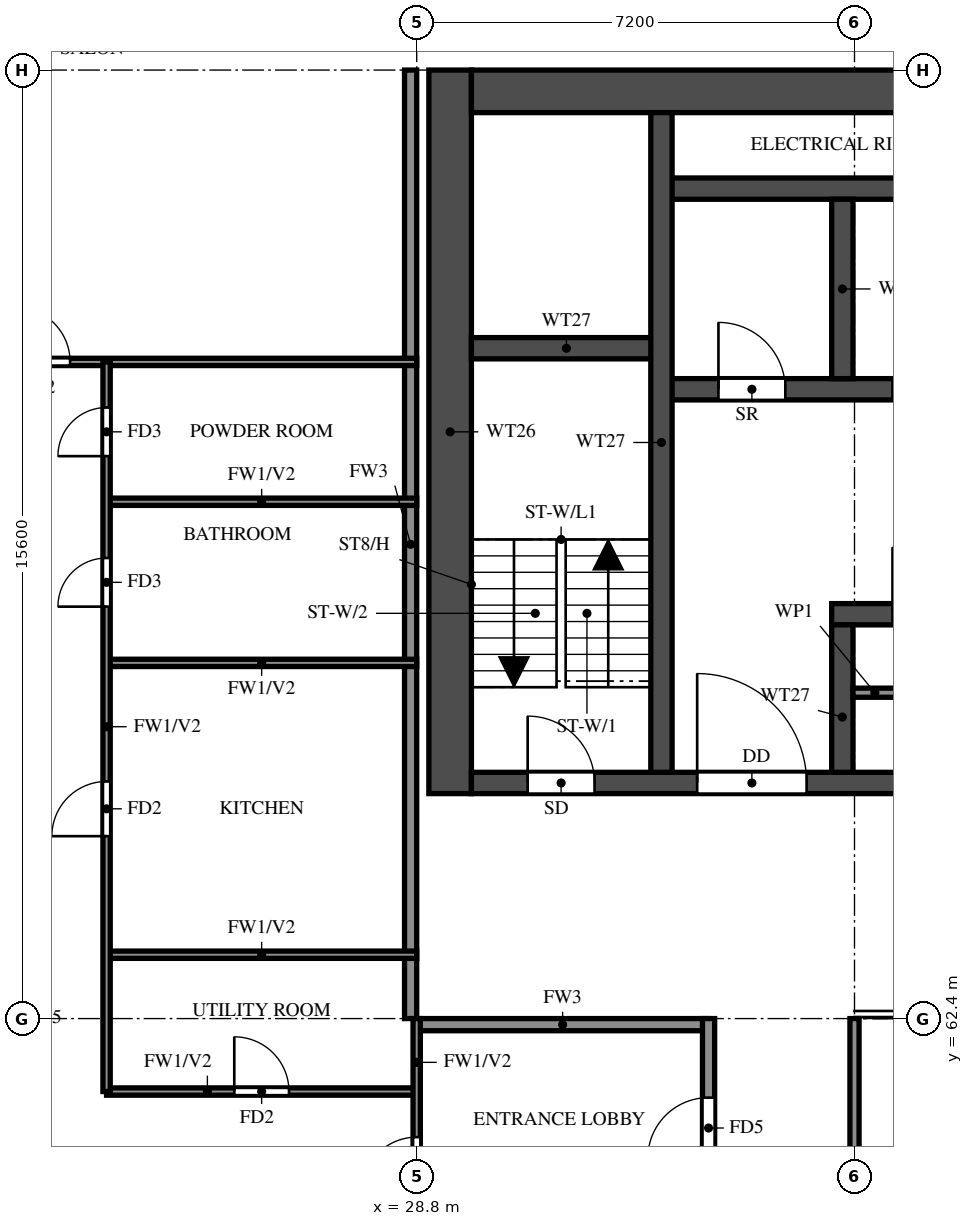
"""IFC4 building model, lengths in metres.
Left out: names, types, materials, properties, quantities, classifications, styles, units other than length and angle.
Written with IfcOpenShell. Run it as: python <this file> out.ifc"""

import sys

from ifc_helpers import new_model, si_unit, direction, frame, frame_2d, origin, place, context, subcontext, project, spatial, rectangle, extrude, element, fill, save


model = new_model("IFC4")
c1 = context("Model", 3, precision=1e-05, world=origin(), true_north=direction((0.0, 1.0)))
c2 = subcontext(c1, "Body", "Model", "MODEL_VIEW")
j1 = project(units=[si_unit("LENGTHUNIT", "METRE"), si_unit("PLANEANGLEUNIT", "RADIAN")], contexts=[c1])
p1 = place(None, origin())
s1 = spatial("IfcSite", under=j1, at=p1, CompositionType="ELEMENT")
p2 = place(p1, origin())
s2 = spatial("IfcBuilding", under=s1, at=p2, CompositionType="ELEMENT")
p3 = place(p2, frame((0.0, 0.0, 153.5)))
s3 = spatial("IfcBuildingStorey", under=s2, at=p3, CompositionType="ELEMENT", Elevation=153.5)
p4 = place(p3, frame((29.35, 66.1, 0.0), z_axis=(0.0, 0.0, 1.0), x_axis=(0.0, 1.0, 0.0)))
e1 = element("IfcWall", 1, at=p4, inside=s3, PredefinedType="SHEAR", context=c2, shape_type="SweptSolid", body=[
    extrude(rectangle(XDim=11.9, YDim=0.7, at=frame_2d((5.95, 0.0))), origin(), (0.0, 0.0, 1.0), 3.2),
])
p5 = place(p3, frame((29.7, 77.65, 0.0), z_axis=(0.0, 0.0, 1.0), x_axis=(1.0, 0.0, 0.0)))
e2 = element("IfcWall", 2, at=p5, inside=s3, PredefinedType="SHEAR", context=c2, shape_type="SweptSolid", body=[
    extrude(rectangle(XDim=41.4, YDim=0.7, at=frame_2d((20.7, 0.0))), origin(), (0.0, 0.0, 1.0), 3.2),
])
p6 = place(p3, frame((29.7, 66.275, 0.0), z_axis=(0.0, 0.0, 1.0), x_axis=(1.0, 0.0, 0.0)))
e3 = element("IfcWall", 3, at=p6, inside=s3, PredefinedType="SHEAR", context=c2, shape_type="SweptSolid", body=[
    extrude(rectangle(XDim=41.4, YDim=0.35, at=frame_2d((20.7, 0.0))), origin(), (0.0, 0.0, 1.0), 3.2),
])
p7 = place(p6, frame((0.925, 0.0, 0.0)))
e4 = element("IfcOpeningElement", 4, at=p7, cuts=e3, PredefinedType="OPENING", context=c2, shape_type="SweptSolid", body=[
    extrude(rectangle(XDim=1.1, YDim=2.1, at=frame_2d((0.55, 1.05))), frame((0.0, 0.185, 0.0), z_axis=(0.0, -1.0, 0.0), x_axis=(1.0, 0.0, 0.0)), (0.0, 0.0, 1.0), 0.37),
])
p8 = place(p6, frame((3.712, 0.0, 0.0)))
e5 = element("IfcOpeningElement", 5, at=p8, cuts=e3, PredefinedType="OPENING", context=c2, shape_type="SweptSolid", body=[
    extrude(rectangle(XDim=1.8, YDim=2.1, at=frame_2d((0.9, 1.05))), frame((0.0, 0.185, 0.0), z_axis=(0.0, -1.0, 0.0), x_axis=(1.0, 0.0, 0.0)), (0.0, 0.0, 1.0), 0.37),
])
p9 = place(p3, frame((35.625, 69.05, 0.0), z_axis=(0.0, 0.0, 1.0), x_axis=(1.0, 0.0, 0.0)))
e6 = element("IfcWall", 6, at=p9, inside=s3, PredefinedType="SHEAR", context=c2, shape_type="SweptSolid", body=[
    extrude(rectangle(XDim=24.1, YDim=0.35, at=frame_2d((12.05, 0.0))), origin(), (0.0, 0.0, 1.0), 3.2),
])
p10 = place(p9, frame((1.0, 0.0, 0.0)))
e7 = element("IfcOpeningElement", 7, at=p10, cuts=e6, PredefinedType="OPENING", context=c2, shape_type="SweptSolid", body=[
    extrude(rectangle(XDim=1.1, YDim=2.1, at=frame_2d((0.55, 1.05))), frame((0.0, 0.185, 0.0), z_axis=(0.0, -1.0, 0.0), x_axis=(1.0, 0.0, 0.0)), (0.0, 0.0, 1.0), 0.37),
])
p11 = place(p9, frame((3.75, 0.0, 0.0)))
e8 = element("IfcOpeningElement", 8, at=p11, cuts=e6, PredefinedType="OPENING", context=c2, shape_type="SweptSolid", body=[
    extrude(rectangle(XDim=1.1, YDim=2.1, at=frame_2d((0.55, 1.05))), frame((0.0, 0.185, 0.0), z_axis=(0.0, -1.0, 0.0), x_axis=(1.0, 0.0, 0.0)), (0.0, 0.0, 1.0), 0.37),
])
p12 = place(p9, frame((6.5, 0.0, 0.0)))
e9 = element("IfcOpeningElement", 9, at=p12, cuts=e6, PredefinedType="OPENING", context=c2, shape_type="SweptSolid", body=[
    extrude(rectangle(XDim=1.1, YDim=2.1, at=frame_2d((0.55, 1.05))), frame((0.0, 0.185, 0.0), z_axis=(0.0, -1.0, 0.0), x_axis=(1.0, 0.0, 0.0)), (0.0, 0.0, 1.0), 0.37),
])
p13 = place(p9, frame((9.25, 0.0, 0.0)))
e10 = element("IfcOpeningElement", 10, at=p13, cuts=e6, PredefinedType="OPENING", context=c2, shape_type="SweptSolid", body=[
    extrude(rectangle(XDim=1.1, YDim=2.1, at=frame_2d((0.55, 1.05))), frame((0.0, 0.185, 0.0), z_axis=(0.0, -1.0, 0.0), x_axis=(1.0, 0.0, 0.0)), (0.0, 0.0, 1.0), 0.37),
])
p14 = place(p9, frame((12.0, 0.0, 0.0)))
e11 = element("IfcOpeningElement", 11, at=p14, cuts=e6, PredefinedType="OPENING", context=c2, shape_type="SweptSolid", body=[
    extrude(rectangle(XDim=1.1, YDim=2.1, at=frame_2d((0.55, 1.05))), frame((0.0, 0.185, 0.0), z_axis=(0.0, -1.0, 0.0), x_axis=(1.0, 0.0, 0.0)), (0.0, 0.0, 1.0), 0.37),
])
p15 = place(p9, frame((14.75, 0.0, 0.0)))
e12 = element("IfcOpeningElement", 12, at=p15, cuts=e6, PredefinedType="OPENING", context=c2, shape_type="SweptSolid", body=[
    extrude(rectangle(XDim=1.1, YDim=2.1, at=frame_2d((0.55, 1.05))), frame((0.0, 0.185, 0.0), z_axis=(0.0, -1.0, 0.0), x_axis=(1.0, 0.0, 0.0)), (0.0, 0.0, 1.0), 0.37),
])
p16 = place(p9, frame((17.625, 0.0, 0.0)))
e13 = element("IfcOpeningElement", 13, at=p16, cuts=e6, PredefinedType="OPENING", context=c2, shape_type="SweptSolid", body=[
    extrude(rectangle(XDim=1.1, YDim=2.1, at=frame_2d((0.55, 1.05))), frame((0.0, 0.185, 0.0), z_axis=(0.0, -1.0, 0.0), x_axis=(1.0, 0.0, 0.0)), (0.0, 0.0, 1.0), 0.37),
])
p17 = place(p9, frame((20.625, 0.0, 0.0)))
e14 = element("IfcOpeningElement", 14, at=p17, cuts=e6, PredefinedType="OPENING", context=c2, shape_type="SweptSolid", body=[
    extrude(rectangle(XDim=1.1, YDim=2.1, at=frame_2d((0.55, 1.05))), frame((0.0, 0.185, 0.0), z_axis=(0.0, -1.0, 0.0), x_axis=(1.0, 0.0, 0.0)), (0.0, 0.0, 1.0), 0.37),
])
p18 = place(p3, frame((32.825, 72.75, 0.0), z_axis=(0.0, 0.0, 1.0), x_axis=(1.0, 0.0, 0.0)))
e15 = element("IfcWall", 15, at=p18, inside=s3, PredefinedType="SHEAR", context=c2, shape_type="SweptSolid", body=[
    extrude(rectangle(XDim=35.15, YDim=0.35, at=frame_2d((17.575, 0.0))), origin(), (0.0, 0.0, 1.0), 3.2),
])
p19 = place(p18, frame((19.8, 0.0, 0.0)))
e16 = element("IfcOpeningElement", 16, at=p19, cuts=e15, PredefinedType="OPENING", context=c2, shape_type="SweptSolid", body=[
    extrude(rectangle(XDim=1.1, YDim=2.1, at=frame_2d((0.55, 1.05))), frame((0.0, 0.185, 0.0), z_axis=(0.0, -1.0, 0.0), x_axis=(1.0, 0.0, 0.0)), (0.0, 0.0, 1.0), 0.37),
])
p20 = place(p18, frame((27.7, 0.0, 0.0)))
e17 = element("IfcOpeningElement", 17, at=p20, cuts=e15, PredefinedType="OPENING", context=c2, shape_type="SweptSolid", body=[
    extrude(rectangle(XDim=1.1, YDim=2.1, at=frame_2d((0.55, 1.05))), frame((0.0, 0.185, 0.0), z_axis=(0.0, -1.0, 0.0), x_axis=(1.0, 0.0, 0.0)), (0.0, 0.0, 1.0), 0.37),
])
p21 = place(p18, frame((30.3, 0.0, 0.0)))
e18 = element("IfcOpeningElement", 18, at=p21, cuts=e15, PredefinedType="OPENING", context=c2, shape_type="SweptSolid", body=[
    extrude(rectangle(XDim=1.1, YDim=2.1, at=frame_2d((0.55, 1.05))), frame((0.0, 0.185, 0.0), z_axis=(0.0, -1.0, 0.0), x_axis=(1.0, 0.0, 0.0)), (0.0, 0.0, 1.0), 0.37),
])
p22 = place(p18, frame((3.8, 0.0, 0.0)))
e19 = element("IfcOpeningElement", 19, at=p22, cuts=e15, PredefinedType="OPENING", context=c2, shape_type="SweptSolid", body=[
    extrude(rectangle(XDim=1.1, YDim=2.1, at=frame_2d((0.55, 1.05))), frame((0.0, 0.185, 0.0), z_axis=(0.0, -1.0, 0.0), x_axis=(1.0, 0.0, 0.0)), (0.0, 0.0, 1.0), 0.37),
])
p23 = place(p18, frame((6.55, 0.0, 0.0)))
e20 = element("IfcOpeningElement", 20, at=p23, cuts=e15, PredefinedType="OPENING", context=c2, shape_type="SweptSolid", body=[
    extrude(rectangle(XDim=1.1, YDim=2.1, at=frame_2d((0.55, 1.05))), frame((0.0, 0.185, 0.0), z_axis=(0.0, -1.0, 0.0), x_axis=(1.0, 0.0, 0.0)), (0.0, 0.0, 1.0), 0.37),
])
p24 = place(p18, frame((9.3, 0.0, 0.0)))
e21 = element("IfcOpeningElement", 21, at=p24, cuts=e15, PredefinedType="OPENING", context=c2, shape_type="SweptSolid", body=[
    extrude(rectangle(XDim=1.1, YDim=2.1, at=frame_2d((0.55, 1.05))), frame((0.0, 0.185, 0.0), z_axis=(0.0, -1.0, 0.0), x_axis=(1.0, 0.0, 0.0)), (0.0, 0.0, 1.0), 0.37),
])
p25 = place(p18, frame((12.05, 0.0, 0.0)))
e22 = element("IfcOpeningElement", 22, at=p25, cuts=e15, PredefinedType="OPENING", context=c2, shape_type="SweptSolid", body=[
    extrude(rectangle(XDim=1.1, YDim=2.1, at=frame_2d((0.55, 1.05))), frame((0.0, 0.185, 0.0), z_axis=(0.0, -1.0, 0.0), x_axis=(1.0, 0.0, 0.0)), (0.0, 0.0, 1.0), 0.37),
])
p26 = place(p18, frame((14.8, 0.0, 0.0)))
e23 = element("IfcOpeningElement", 23, at=p26, cuts=e15, PredefinedType="OPENING", context=c2, shape_type="SweptSolid", body=[
    extrude(rectangle(XDim=1.1, YDim=2.1, at=frame_2d((0.55, 1.05))), frame((0.0, 0.185, 0.0), z_axis=(0.0, -1.0, 0.0), x_axis=(1.0, 0.0, 0.0)), (0.0, 0.0, 1.0), 0.37),
])
p27 = place(p18, frame((17.55, 0.0, 0.0)))
e24 = element("IfcOpeningElement", 24, at=p27, cuts=e15, PredefinedType="OPENING", context=c2, shape_type="SweptSolid", body=[
    extrude(rectangle(XDim=1.1, YDim=2.1, at=frame_2d((0.55, 1.05))), frame((0.0, 0.185, 0.0), z_axis=(0.0, -1.0, 0.0), x_axis=(1.0, 0.0, 0.0)), (0.0, 0.0, 1.0), 0.37),
])
p28 = place(p18, frame((0.938, 0.0, 0.0)))
e25 = element("IfcOpeningElement", 25, at=p28, cuts=e15, PredefinedType="OPENING", context=c2, shape_type="SweptSolid", body=[
    extrude(rectangle(XDim=1.1, YDim=2.1, at=frame_2d((0.55, 1.05))), frame((0.0, 0.185, 0.0), z_axis=(0.0, -1.0, 0.0), x_axis=(1.0, 0.0, 0.0)), (0.0, 0.0, 1.0), 0.37),
])
p29 = place(p3, frame((32.825, 76.05, 0.0), z_axis=(0.0, 0.0, 1.0), x_axis=(1.0, 0.0, 0.0)))
e26 = element("IfcWall", 26, at=p29, inside=s3, PredefinedType="SHEAR", context=c2, shape_type="SweptSolid", body=[
    extrude(rectangle(XDim=35.15, YDim=0.35, at=frame_2d((17.575, 0.0))), origin(), (0.0, 0.0, 1.0), 3.2),
])
p30 = place(p3, frame((29.7, 73.425, 0.0), z_axis=(0.0, 0.0, 1.0), x_axis=(1.0, 0.0, 0.0)))
e27 = element("IfcWall", 27, at=p30, inside=s3, PredefinedType="SHEAR", context=c2, shape_type="SweptSolid", body=[
    extrude(rectangle(XDim=3.125, YDim=0.35, at=frame_2d((1.562, 0.0))), origin(), (0.0, 0.0, 1.0), 3.2),
])
p31 = place(p3, frame((32.825, 66.45, 0.0), z_axis=(0.0, 0.0, 1.0), x_axis=(0.0, 1.0, 0.0)))
e28 = element("IfcWall", 28, at=p31, inside=s3, PredefinedType="SHEAR", context=c2, shape_type="SweptSolid", body=[
    extrude(rectangle(XDim=10.85, YDim=0.35, at=frame_2d((5.425, 0.0))), origin(), (0.0, 0.0, 1.0), 3.2),
])
p32 = place(p3, frame((35.8, 66.45, 0.0), z_axis=(0.0, 0.0, 1.0), x_axis=(0.0, 1.0, 0.0)))
e29 = element("IfcWall", 29, at=p32, inside=s3, PredefinedType="SHEAR", context=c2, shape_type="SweptSolid", body=[
    extrude(rectangle(XDim=2.425, YDim=0.35, at=frame_2d((1.212, 0.0))), origin(), (0.0, 0.0, 1.0), 3.2),
])
p33 = place(p3, frame((35.8, 72.925, 0.0), z_axis=(0.0, 0.0, 1.0), x_axis=(0.0, 1.0, 0.0)))
e30 = element("IfcWall", 30, at=p33, inside=s3, PredefinedType="SHEAR", context=c2, shape_type="SweptSolid", body=[
    extrude(rectangle(XDim=2.95, YDim=0.35, at=frame_2d((1.475, 0.0))), origin(), (0.0, 0.0, 1.0), 3.2),
])
p34 = place(p3, frame((35.975, 67.76, 0.0), z_axis=(0.0, 0.0, 1.0), x_axis=(1.0, 0.0, 0.0)))
e31 = element("IfcWall", 31, at=p34, inside=s3, PredefinedType="PARTITIONING", context=c2, shape_type="SweptSolid", body=[
    extrude(rectangle(XDim=2.4, YDim=0.15, at=frame_2d((1.2, 0.0))), origin(), (0.0, 0.0, 1.0), 3.2),
])
p35 = place(p34, frame((0.75, 0.0, 0.0)))
e32 = element("IfcOpeningElement", 32, at=p35, cuts=e31, PredefinedType="OPENING", context=c2, shape_type="SweptSolid", body=[
    extrude(rectangle(XDim=0.9, YDim=2.1, at=frame_2d((0.45, 1.05))), frame((0.0, 0.085, 0.0), z_axis=(0.0, -1.0, 0.0), x_axis=(1.0, 0.0, 0.0)), (0.0, 0.0, 1.0), 0.17),
])
p36 = place(p3, frame((28.8, 62.3, 0.0), z_axis=(0.0, 0.0, 1.0), x_axis=(1.0, 0.0, 0.0)))
e33 = element("IfcWall", 33, at=p36, inside=s3, PredefinedType="SOLIDWALL", context=c2, shape_type="SweptSolid", body=[
    extrude(rectangle(XDim=4.8, YDim=0.2, at=frame_2d((2.4, 0.0))), origin(), (0.0, 0.0, 1.0), 3.2),
])
p37 = place(p3, frame((28.7, 62.4, 0.0), z_axis=(0.0, 0.0, 1.0), x_axis=(0.0, 1.0, 0.0)))
e34 = element("IfcWall", 34, at=p37, inside=s3, PredefinedType="SOLIDWALL", context=c2, shape_type="SweptSolid", body=[
    extrude(rectangle(XDim=15.6, YDim=0.2, at=frame_2d((7.8, 0.0))), origin(), (0.0, 0.0, 1.0), 3.2),
])
p38 = place(p3, frame((33.6, 50.4, 0.0), z_axis=(0.0, 0.0, 1.0), x_axis=(0.0, 1.0, 0.0)))
e35 = element("IfcWall", 35, at=p38, inside=s3, PredefinedType="SOLIDWALL", context=c2, shape_type="SweptSolid", body=[
    extrude(rectangle(XDim=12.0, YDim=0.2, at=frame_2d((6.0, 0.0))), origin(), (0.0, 0.0, 1.0), 3.2),
])
p39 = place(p38, frame((0.7, 0.0, 0.0)))
e36 = element("IfcOpeningElement", 36, at=p39, cuts=e35, PredefinedType="OPENING", context=c2, shape_type="SweptSolid", body=[
    extrude(rectangle(XDim=1.0, YDim=2.1, at=frame_2d((0.5, 1.05))), frame((0.0, 0.11, 0.0), z_axis=(0.0, -1.0, 0.0), x_axis=(1.0, 0.0, 0.0)), (0.0, 0.0, 1.0), 0.22),
])
p40 = place(p38, frame((9.7, 0.0, 0.0)))
e37 = element("IfcOpeningElement", 37, at=p40, cuts=e35, PredefinedType="OPENING", context=c2, shape_type="SweptSolid", body=[
    extrude(rectangle(XDim=1.0, YDim=2.1, at=frame_2d((0.5, 1.05))), frame((0.0, 0.11, 0.0), z_axis=(0.0, -1.0, 0.0), x_axis=(1.0, 0.0, 0.0)), (0.0, 0.0, 1.0), 0.22),
])
p41 = place(p3, frame((23.7, 61.2, 0.0), z_axis=(0.0, 0.0, 1.0), x_axis=(1.0, 0.0, 0.0)))
e38 = element("IfcWall", 38, at=p41, inside=s3, PredefinedType="PARTITIONING", context=c2, shape_type="SweptSolid", body=[
    extrude(rectangle(XDim=5.1, YDim=0.12, at=frame_2d((2.55, 0.0))), origin(), (0.0, 0.0, 1.0), 3.2),
])
p42 = place(p41, frame((2.1, 0.0, 0.0)))
e39 = element("IfcOpeningElement", 39, at=p42, cuts=e38, PredefinedType="OPENING", context=c2, shape_type="SweptSolid", body=[
    extrude(rectangle(XDim=0.9, YDim=2.1, at=frame_2d((0.45, 1.05))), frame((0.0, 0.07, 0.0), z_axis=(0.0, -1.0, 0.0), x_axis=(1.0, 0.0, 0.0)), (0.0, 0.0, 1.0), 0.14),
])
for number, where, z_axis, x_axis in (
    (40, (23.7, 63.45, 0.0), (0.0, 0.0, 1.0), (1.0, 0.0, 0.0)),
    (41, (23.7, 68.25, 0.0), (0.0, 0.0, 1.0), (1.0, 0.0, 0.0)),
    (42, (23.7, 70.9, 0.0), (0.0, 0.0, 1.0), (1.0, 0.0, 0.0)),
):
    element("IfcWall", number, at=place(p3, frame(where, z_axis=z_axis, x_axis=x_axis)), inside=s3, PredefinedType="PARTITIONING", context=c2, shape_type="SweptSolid", body=[
        extrude(rectangle(XDim=5.1, YDim=0.12, at=frame_2d((2.55, 0.0))), origin(), (0.0, 0.0, 1.0), 3.2),
    ])
p43 = place(p3, frame((14.525, 73.2, 0.0), z_axis=(0.0, 0.0, 1.0), x_axis=(1.0, 0.0, 0.0)))
e43 = element("IfcWall", 43, at=p43, inside=s3, PredefinedType="PARTITIONING", context=c2, shape_type="SweptSolid", body=[
    extrude(rectangle(XDim=14.275, YDim=0.12, at=frame_2d((7.138, 0.0))), origin(), (0.0, 0.0, 1.0), 2.3),
])
p44 = place(p43, frame((7.675, 0.0, 0.0)))
e44 = element("IfcOpeningElement", 44, at=p44, cuts=e43, PredefinedType="OPENING", context=c2, shape_type="SweptSolid", body=[
    extrude(rectangle(XDim=0.9, YDim=2.1, at=frame_2d((0.45, 1.05))), frame((0.0, 0.07, 0.0), z_axis=(0.0, -1.0, 0.0), x_axis=(1.0, 0.0, 0.0)), (0.0, 0.0, 1.0), 0.14),
])
p45 = place(p3, frame((23.7, 61.2, 0.0), z_axis=(0.0, 0.0, 1.0), x_axis=(0.0, 1.0, 0.0)))
e45 = element("IfcWall", 45, at=p45, inside=s3, PredefinedType="PARTITIONING", context=c2, shape_type="SweptSolid", body=[
    extrude(rectangle(XDim=12.0, YDim=0.12, at=frame_2d((6.0, 0.0))), origin(), (0.0, 0.0, 1.0), 3.2),
])
p46 = place(p45, frame((4.2, 0.0, 0.0)))
e46 = element("IfcOpeningElement", 46, at=p46, cuts=e45, PredefinedType="OPENING", context=c2, shape_type="SweptSolid", body=[
    extrude(rectangle(XDim=0.9, YDim=2.1, at=frame_2d((0.45, 1.05))), frame((0.0, 0.07, 0.0), z_axis=(0.0, -1.0, 0.0), x_axis=(1.0, 0.0, 0.0)), (0.0, 0.0, 1.0), 0.14),
])
p47 = place(p45, frame((7.975, 0.0, 0.0)))
e47 = element("IfcOpeningElement", 47, at=p47, cuts=e45, PredefinedType="OPENING", context=c2, shape_type="SweptSolid", body=[
    extrude(rectangle(XDim=0.8, YDim=2.1, at=frame_2d((0.4, 1.05))), frame((0.0, 0.07, 0.0), z_axis=(0.0, -1.0, 0.0), x_axis=(1.0, 0.0, 0.0)), (0.0, 0.0, 1.0), 0.14),
])
p48 = place(p45, frame((10.45, 0.0, 0.0)))
e48 = element("IfcOpeningElement", 48, at=p48, cuts=e45, PredefinedType="OPENING", context=c2, shape_type="SweptSolid", body=[
    extrude(rectangle(XDim=0.8, YDim=2.1, at=frame_2d((0.4, 1.05))), frame((0.0, 0.07, 0.0), z_axis=(0.0, -1.0, 0.0), x_axis=(1.0, 0.0, 0.0)), (0.0, 0.0, 1.0), 0.14),
])
p49 = place(p3, frame((28.8, 58.8, 0.0), z_axis=(0.0, 0.0, 1.0), x_axis=(0.0, 1.0, 0.0)))
e49 = element("IfcWall", 49, at=p49, inside=s3, PredefinedType="PARTITIONING", context=c2, shape_type="SweptSolid", body=[
    extrude(rectangle(XDim=3.6, YDim=0.12, at=frame_2d((1.8, 0.0))), origin(), (0.0, 0.0, 1.0), 3.2),
])
p50 = place(p49, frame((0.75, 0.0, 0.0)))
e50 = element("IfcOpeningElement", 50, at=p50, cuts=e49, PredefinedType="OPENING", context=c2, shape_type="SweptSolid", body=[
    extrude(rectangle(XDim=0.9, YDim=2.1, at=frame_2d((0.45, 1.05))), frame((0.0, 0.07, 0.0), z_axis=(0.0, -1.0, 0.0), x_axis=(1.0, 0.0, 0.0)), (0.0, 0.0, 1.0), 0.14),
])
p51 = place(p3, frame((36.0, 48.0, 0.0), z_axis=(0.0, 0.0, 1.0), x_axis=(0.0, 1.0, 0.0)))
e51 = element("IfcWall", 51, at=p51, inside=s3, PredefinedType="SOLIDWALL", context=c2, shape_type="SweptSolid", body=[
    extrude(rectangle(XDim=14.4, YDim=0.15, at=frame_2d((7.2, 0.0))), origin(), (0.0, 0.0, 1.0), 2.3),
])
p52 = place(p7, origin())
e52 = element("IfcDoor", 52, at=p52, inside=s3, OperationType="SINGLE_SWING_LEFT", PredefinedType="DOOR", context=c2, shape_type="SweptSolid", body=[
    extrude(rectangle(XDim=1.1, YDim=2.1, at=frame_2d((0.55, 1.05))), frame((0.0, 0.025, 0.0), z_axis=(0.0, -1.0, 0.0), x_axis=(1.0, 0.0, 0.0)), (0.0, 0.0, 1.0), 0.05),
])
fill(e4, e52)
p53 = place(p8, origin())
e53 = element("IfcDoor", 53, at=p53, inside=s3, OperationType="DOUBLE_DOOR_SINGLE_SWING", PredefinedType="DOOR", context=c2, shape_type="SweptSolid", body=[
    extrude(rectangle(XDim=1.8, YDim=2.1, at=frame_2d((0.9, 1.05))), frame((0.0, 0.025, 0.0), z_axis=(0.0, -1.0, 0.0), x_axis=(1.0, 0.0, 0.0)), (0.0, 0.0, 1.0), 0.05),
])
fill(e5, e53)
p54 = place(p28, origin())
e54 = element("IfcDoor", 54, at=p54, inside=s3, OperationType="SINGLE_SWING_LEFT", PredefinedType="DOOR", context=c2, shape_type="SweptSolid", body=[
    extrude(rectangle(XDim=1.1, YDim=2.1, at=frame_2d((0.55, 1.05))), frame((0.0, 0.025, 0.0), z_axis=(0.0, -1.0, 0.0), x_axis=(1.0, 0.0, 0.0)), (0.0, 0.0, 1.0), 0.05),
])
fill(e25, e54)
p55 = place(p50, origin())
e55 = element("IfcDoor", 55, at=p55, inside=s3, OperationType="SINGLE_SWING_RIGHT", PredefinedType="DOOR", context=c2, shape_type="SweptSolid", body=[
    extrude(rectangle(XDim=0.9, YDim=2.1, at=frame_2d((0.45, 1.05))), frame((0.0, 0.025, 0.0), z_axis=(0.0, -1.0, 0.0), x_axis=(1.0, 0.0, 0.0)), (0.0, 0.0, 1.0), 0.05),
])
fill(e50, e55)
p56 = place(p40, origin())
e56 = element("IfcDoor", 56, at=p56, inside=s3, OperationType="SINGLE_SWING_LEFT", PredefinedType="DOOR", context=c2, shape_type="SweptSolid", body=[
    extrude(rectangle(XDim=1.0, YDim=2.1, at=frame_2d((0.5, 1.05))), frame((0.0, 0.025, 0.0), z_axis=(0.0, -1.0, 0.0), x_axis=(1.0, 0.0, 0.0)), (0.0, 0.0, 1.0), 0.05),
])
fill(e37, e56)
p57 = place(p44, origin())
e57 = element("IfcDoor", 57, at=p57, inside=s3, OperationType="SINGLE_SWING_LEFT", PredefinedType="DOOR", context=c2, shape_type="SweptSolid", body=[
    extrude(rectangle(XDim=0.9, YDim=2.1, at=frame_2d((0.45, 1.05))), frame((0.0, 0.025, 0.0), z_axis=(0.0, -1.0, 0.0), x_axis=(1.0, 0.0, 0.0)), (0.0, 0.0, 1.0), 0.05),
])
fill(e44, e57)
p58 = place(p42, origin())
e58 = element("IfcDoor", 58, at=p58, inside=s3, OperationType="SINGLE_SWING_RIGHT", PredefinedType="DOOR", context=c2, shape_type="SweptSolid", body=[
    extrude(rectangle(XDim=0.9, YDim=2.1, at=frame_2d((0.45, 1.05))), frame((0.0, 0.025, 0.0), z_axis=(0.0, -1.0, 0.0), x_axis=(1.0, 0.0, 0.0)), (0.0, 0.0, 1.0), 0.05),
])
fill(e39, e58)
p59 = place(p46, origin())
e59 = element("IfcDoor", 59, at=p59, inside=s3, OperationType="SINGLE_SWING_LEFT", PredefinedType="DOOR", context=c2, shape_type="SweptSolid", body=[
    extrude(rectangle(XDim=0.9, YDim=2.1, at=frame_2d((0.45, 1.05))), frame((0.0, 0.025, 0.0), z_axis=(0.0, -1.0, 0.0), x_axis=(1.0, 0.0, 0.0)), (0.0, 0.0, 1.0), 0.05),
])
fill(e46, e59)
p60 = place(p47, origin())
e60 = element("IfcDoor", 60, at=p60, inside=s3, OperationType="SINGLE_SWING_LEFT", PredefinedType="DOOR", context=c2, shape_type="SweptSolid", body=[
    extrude(rectangle(XDim=0.8, YDim=2.1, at=frame_2d((0.4, 1.05))), frame((0.0, 0.025, 0.0), z_axis=(0.0, -1.0, 0.0), x_axis=(1.0, 0.0, 0.0)), (0.0, 0.0, 1.0), 0.05),
])
fill(e47, e60)
p61 = place(p48, origin())
e61 = element("IfcDoor", 61, at=p61, inside=s3, OperationType="SINGLE_SWING_RIGHT", PredefinedType="DOOR", context=c2, shape_type="SweptSolid", body=[
    extrude(rectangle(XDim=0.8, YDim=2.1, at=frame_2d((0.4, 1.05))), frame((0.0, 0.025, 0.0), z_axis=(0.0, -1.0, 0.0), x_axis=(1.0, 0.0, 0.0)), (0.0, 0.0, 1.0), 0.05),
])
fill(e48, e61)
save(model, sys.argv[1])
